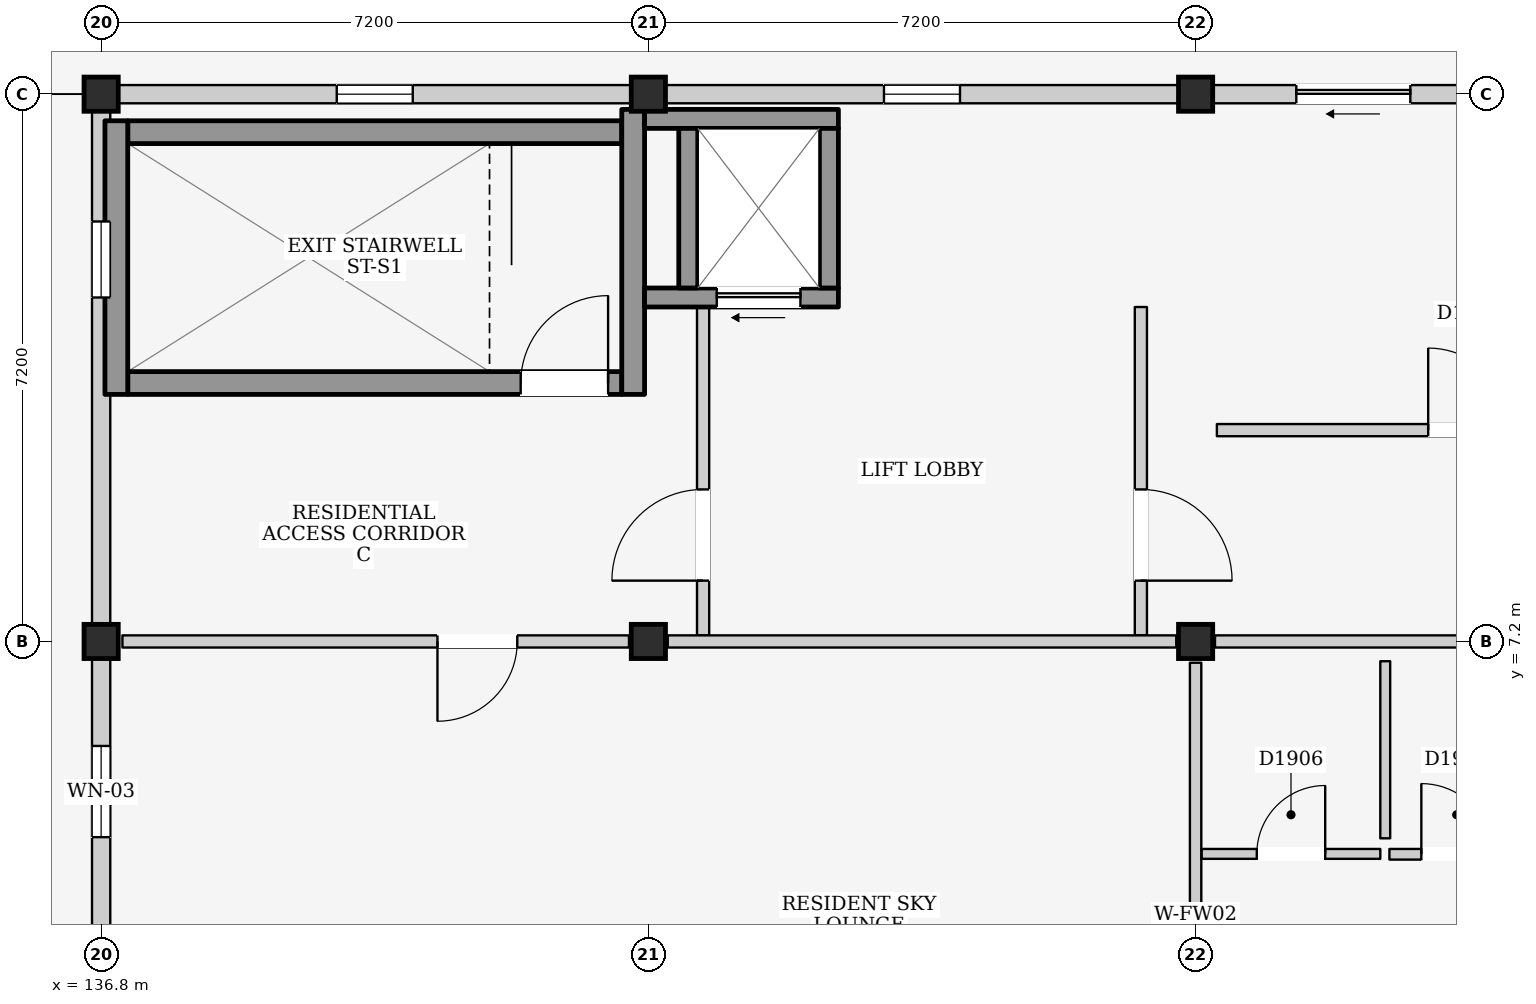
"""IFC4 building model, lengths in metres.
Left out: names, types, materials, properties, quantities, classifications, styles, units other than length and angle.
Written with IfcOpenShell. Run it as: python <this file> out.ifc"""

import sys

from ifc_helpers import new_model, si_unit, direction, frame, frame_2d, origin, origin_2d, place, context, subcontext, project, spatial, rectangle, extrude, element, fill, save


model = new_model("IFC4")
c1 = context("Model", 3, precision=1e-05, world=origin(), true_north=direction((0.0, 1.0)))
c2 = subcontext(c1, "Body", "Model", "MODEL_VIEW")
j1 = project(units=[si_unit("LENGTHUNIT", "METRE"), si_unit("PLANEANGLEUNIT", "RADIAN")], contexts=[c1])
p1 = place(None, origin())
s1 = spatial("IfcSite", under=j1, at=p1, CompositionType="ELEMENT")
p2 = place(p1, origin())
s2 = spatial("IfcBuilding", under=s1, at=p2, CompositionType="ELEMENT")
p3 = place(p2, frame((0.0, 0.0, 34.8)))
s3 = spatial("IfcBuildingStorey", under=s2, at=p3, CompositionType="ELEMENT", Elevation=34.8)
for number, where, z_axis, x_axis in (
    (1, (136.8, 7.2, 0.0), (0.0, 0.0, 1.0), (1.0, 0.0, 0.0)),
    (2, (136.8, 14.4, 0.0), (0.0, 0.0, 1.0), (1.0, 0.0, 0.0)),
    (3, (144.0, 7.2, 0.0), (0.0, 0.0, 1.0), (1.0, 0.0, 0.0)),
    (4, (144.0, 14.4, 0.0), (0.0, 0.0, 1.0), (1.0, 0.0, 0.0)),
    (5, (151.2, 7.2, 0.0), (0.0, 0.0, 1.0), (1.0, 0.0, 0.0)),
    (6, (151.2, 14.4, 0.0), (0.0, 0.0, 1.0), (1.0, 0.0, 0.0)),
):
    element("IfcColumn", number, at=place(p3, frame(where, z_axis=z_axis, x_axis=x_axis)), inside=s3, PredefinedType="COLUMN", context=c2, shape_type="SweptSolid", body=[
        extrude(rectangle(XDim=0.45, YDim=0.45, at=origin_2d()), origin(), (0.0, 0.0, 1.0), 3.2),
    ])
p4 = place(p3, frame((136.8, 0.225, 0.0), z_axis=(0.0, 0.0, 1.0), x_axis=(0.0, 1.0, 0.0)))
e7 = element("IfcWall", 7, at=p4, inside=s3, PredefinedType="ELEMENTEDWALL", context=c2, shape_type="SweptSolid", body=[
    extrude(rectangle(XDim=6.75, YDim=0.24, at=frame_2d((3.375, 0.0))), origin(), (0.0, 0.0, 1.0), 2.445),
])
p5 = place(p4, frame((1.4, 0.0, 0.0)))
e8 = element("IfcOpeningElement", 8, at=p5, cuts=e7, PredefinedType="OPENING", context=c2, shape_type="SweptSolid", body=[
    extrude(rectangle(XDim=1.4, YDim=2.1, at=frame_2d((0.7, 1.05))), frame((0.0, 0.135, 0.0), z_axis=(0.0, -1.0, 0.0), x_axis=(1.0, 0.0, 0.0)), (0.0, 0.0, 1.0), 0.27),
])
p6 = place(p4, frame((4.4, 0.0, 0.95)))
e9 = element("IfcOpeningElement", 9, at=p6, cuts=e7, PredefinedType="OPENING", context=c2, shape_type="SweptSolid", body=[
    extrude(rectangle(XDim=1.2, YDim=1.35, at=frame_2d((0.6, 0.675))), frame((0.0, 0.135, 0.0), z_axis=(0.0, -1.0, 0.0), x_axis=(1.0, 0.0, 0.0)), (0.0, 0.0, 1.0), 0.27),
])
p7 = place(p3, frame((137.025, 14.4, 0.0), z_axis=(0.0, 0.0, 1.0), x_axis=(1.0, 0.0, 0.0)))
e10 = element("IfcWall", 10, at=p7, inside=s3, PredefinedType="ELEMENTEDWALL", context=c2, shape_type="SweptSolid", body=[
    extrude(rectangle(XDim=6.75, YDim=0.24, at=frame_2d((3.375, 0.0))), origin(), (0.0, 0.0, 1.0), 2.345),
])
p8 = place(p7, frame((2.875, 0.0, 1.2)))
e11 = element("IfcOpeningElement", 11, at=p8, cuts=e10, PredefinedType="OPENING", context=c2, shape_type="SweptSolid", body=[
    extrude(rectangle(XDim=1.0, YDim=0.9, at=frame_2d((0.5, 0.45))), frame((0.0, 0.135, 0.0), z_axis=(0.0, -1.0, 0.0), x_axis=(1.0, 0.0, 0.0)), (0.0, 0.0, 1.0), 0.27),
])
p9 = place(p3, frame((136.8, 7.425, 0.0), z_axis=(0.0, 0.0, 1.0), x_axis=(0.0, 1.0, 0.0)))
e12 = element("IfcWall", 12, at=p9, inside=s3, PredefinedType="ELEMENTEDWALL", context=c2, shape_type="SweptSolid", body=[
    extrude(rectangle(XDim=6.75, YDim=0.24, at=frame_2d((3.375, 0.0))), origin(), (0.0, 0.0, 1.0), 2.445),
])
p10 = place(p9, frame((4.3, 0.0, 1.2)))
e13 = element("IfcOpeningElement", 13, at=p10, cuts=e12, PredefinedType="OPENING", context=c2, shape_type="SweptSolid", body=[
    extrude(rectangle(XDim=1.0, YDim=0.9, at=frame_2d((0.5, 0.45))), frame((0.0, 0.135, 0.0), z_axis=(0.0, -1.0, 0.0), x_axis=(1.0, 0.0, 0.0)), (0.0, 0.0, 1.0), 0.27),
])
p11 = place(p3, frame((144.225, 14.4, 0.0), z_axis=(0.0, 0.0, 1.0), x_axis=(1.0, 0.0, 0.0)))
e14 = element("IfcWall", 14, at=p11, inside=s3, PredefinedType="ELEMENTEDWALL", context=c2, shape_type="SweptSolid", body=[
    extrude(rectangle(XDim=6.75, YDim=0.24, at=frame_2d((3.375, 0.0))), origin(), (0.0, 0.0, 1.0), 2.345),
])
p12 = place(p11, frame((2.875, 0.0, 1.2)))
e15 = element("IfcOpeningElement", 15, at=p12, cuts=e14, PredefinedType="OPENING", context=c2, shape_type="SweptSolid", body=[
    extrude(rectangle(XDim=1.0, YDim=0.9, at=frame_2d((0.5, 0.45))), frame((0.0, 0.135, 0.0), z_axis=(0.0, -1.0, 0.0), x_axis=(1.0, 0.0, 0.0)), (0.0, 0.0, 1.0), 0.27),
])
p13 = place(p3, frame((151.425, 14.4, 0.0), z_axis=(0.0, 0.0, 1.0), x_axis=(1.0, 0.0, 0.0)))
e16 = element("IfcWall", 16, at=p13, inside=s3, PredefinedType="ELEMENTEDWALL", context=c2, shape_type="SweptSolid", body=[
    extrude(rectangle(XDim=6.75, YDim=0.24, at=frame_2d((3.375, 0.0))), origin(), (0.0, 0.0, 1.0), 2.345),
])
p14 = place(p13, frame((1.1, 0.0, 0.0)))
e17 = element("IfcOpeningElement", 17, at=p14, cuts=e16, PredefinedType="OPENING", context=c2, shape_type="SweptSolid", body=[
    extrude(rectangle(XDim=1.5, YDim=2.12, at=frame_2d((0.75, 1.06))), frame((0.0, 0.135, 0.0), z_axis=(0.0, -1.0, 0.0), x_axis=(1.0, 0.0, 0.0)), (0.0, 0.0, 1.0), 0.27),
])
p15 = place(p13, frame((3.6, 0.0, 0.735)))
e18 = element("IfcOpeningElement", 18, at=p15, cuts=e16, PredefinedType="OPENING", context=c2, shape_type="SweptSolid", body=[
    extrude(rectangle(XDim=1.35, YDim=1.5, at=frame_2d((0.675, 0.75))), frame((0.0, 0.135, 0.0), z_axis=(0.0, -1.0, 0.0), x_axis=(1.0, 0.0, 0.0)), (0.0, 0.0, 1.0), 0.27),
])
p16 = place(p3, frame((137.15, 10.6, 0.0), z_axis=(0.0, 0.0, 1.0), x_axis=(1.0, 0.0, 0.0)))
e19 = element("IfcWall", 19, at=p16, inside=s3, PredefinedType="SHEAR", context=c2, shape_type="SweptSolid", body=[
    extrude(rectangle(XDim=6.5, YDim=0.3, at=frame_2d((3.25, 0.0))), origin(), (0.0, 0.0, 1.0), 2.96),
])
p17 = place(p16, frame((5.17, 0.0, 0.0)))
e20 = element("IfcOpeningElement", 20, at=p17, cuts=e19, PredefinedType="OPENING", context=c2, shape_type="SweptSolid", body=[
    extrude(rectangle(XDim=1.15, YDim=2.2, at=frame_2d((0.575, 1.1))), frame((0.0, 0.165, 0.0), z_axis=(0.0, -1.0, 0.0), x_axis=(1.0, 0.0, 0.0)), (0.0, 0.0, 1.0), 0.33),
])
p18 = place(p3, frame((137.15, 13.9, 0.0), z_axis=(0.0, 0.0, 1.0), x_axis=(1.0, 0.0, 0.0)))
e21 = element("IfcWall", 21, at=p18, inside=s3, PredefinedType="SHEAR", context=c2, shape_type="SweptSolid", body=[
    extrude(rectangle(XDim=6.5, YDim=0.3, at=frame_2d((3.25, 0.0))), origin(), (0.0, 0.0, 1.0), 2.96),
])
p19 = place(p3, frame((137.0, 10.45, 0.0), z_axis=(0.0, 0.0, 1.0), x_axis=(0.0, 1.0, 0.0)))
e22 = element("IfcWall", 22, at=p19, inside=s3, PredefinedType="SHEAR", context=c2, shape_type="SweptSolid", body=[
    extrude(rectangle(XDim=3.6, YDim=0.3, at=frame_2d((1.8, 0.0))), origin(), (0.0, 0.0, 1.0), 2.96),
])
p20 = place(p3, frame((143.8, 10.45, 0.0), z_axis=(0.0, 0.0, 1.0), x_axis=(0.0, 1.0, 0.0)))
e23 = element("IfcWall", 23, at=p20, inside=s3, PredefinedType="SHEAR", context=c2, shape_type="SweptSolid", body=[
    extrude(rectangle(XDim=3.75, YDim=0.3, at=frame_2d((1.875, 0.0))), origin(), (0.0, 0.0, 1.0), 2.96),
])
p21 = place(p3, frame((144.72, 7.28, 0.0), z_axis=(0.0, 0.0, 1.0), x_axis=(0.0, 1.0, 0.0)))
e24 = element("IfcWall", 24, at=p21, inside=s3, PredefinedType="PARTITIONING", context=c2, shape_type="SweptSolid", body=[
    extrude(rectangle(XDim=4.32, YDim=0.16, at=frame_2d((2.16, 0.0))), origin(), (0.0, 0.0, 1.0), 2.96),
])
p22 = place(p21, frame((0.72, 0.0, 0.0)))
e25 = element("IfcOpeningElement", 25, at=p22, cuts=e24, PredefinedType="OPENING", context=c2, shape_type="SweptSolid", body=[
    extrude(rectangle(XDim=1.2, YDim=2.2, at=frame_2d((0.6, 1.1))), frame((0.0, 0.095, 0.0), z_axis=(0.0, -1.0, 0.0), x_axis=(1.0, 0.0, 0.0)), (0.0, 0.0, 1.0), 0.19),
])
p23 = place(p3, frame((150.48, 7.28, 0.0), z_axis=(0.0, 0.0, 1.0), x_axis=(0.0, 1.0, 0.0)))
e26 = element("IfcWall", 26, at=p23, inside=s3, PredefinedType="PARTITIONING", context=c2, shape_type="SweptSolid", body=[
    extrude(rectangle(XDim=4.32, YDim=0.16, at=frame_2d((2.16, 0.0))), origin(), (0.0, 0.0, 1.0), 2.96),
])
p24 = place(p23, frame((0.72, 0.0, 0.0)))
e27 = element("IfcOpeningElement", 27, at=p24, cuts=e26, PredefinedType="OPENING", context=c2, shape_type="SweptSolid", body=[
    extrude(rectangle(XDim=1.2, YDim=2.2, at=frame_2d((0.6, 1.1))), frame((0.0, 0.095, 0.0), z_axis=(0.0, -1.0, 0.0), x_axis=(1.0, 0.0, 0.0)), (0.0, 0.0, 1.0), 0.19),
])
p25 = place(p3, frame((143.95, 11.725, 0.0), z_axis=(0.0, 0.0, 1.0), x_axis=(1.0, 0.0, 0.0)))
e28 = element("IfcWall", 28, at=p25, inside=s3, PredefinedType="SHEAR", context=c2, shape_type="SweptSolid", body=[
    extrude(rectangle(XDim=2.55, YDim=0.25, at=frame_2d((1.275, 0.0))), origin(), (0.0, 0.0, 1.0), 2.96),
])
p26 = place(p25, frame((0.95, 0.0, 0.0)))
e29 = element("IfcOpeningElement", 29, at=p26, cuts=e28, PredefinedType="OPENING", context=c2, shape_type="SweptSolid", body=[
    extrude(rectangle(XDim=1.1, YDim=2.15, at=frame_2d((0.55, 1.075))), frame((0.0, 0.14, 0.0), z_axis=(0.0, -1.0, 0.0), x_axis=(1.0, 0.0, 0.0)), (0.0, 0.0, 1.0), 0.28),
])
p27 = place(p3, frame((143.95, 14.075, 0.0), z_axis=(0.0, 0.0, 1.0), x_axis=(1.0, 0.0, 0.0)))
e30 = element("IfcWall", 30, at=p27, inside=s3, PredefinedType="SHEAR", context=c2, shape_type="SweptSolid", body=[
    extrude(rectangle(XDim=2.55, YDim=0.25, at=frame_2d((1.275, 0.0))), origin(), (0.0, 0.0, 1.0), 2.96),
])
for number, where, z_axis, x_axis in (
    (31, (144.525, 11.85, 0.0), (0.0, 0.0, 1.0), (0.0, 1.0, 0.0)),
    (32, (146.375, 11.85, 0.0), (0.0, 0.0, 1.0), (0.0, 1.0, 0.0)),
):
    element("IfcWall", number, at=place(p3, frame(where, z_axis=z_axis, x_axis=x_axis)), inside=s3, PredefinedType="SHEAR", context=c2, shape_type="SweptSolid", body=[
        extrude(rectangle(XDim=2.1, YDim=0.25, at=frame_2d((1.05, 0.0))), origin(), (0.0, 0.0, 1.0), 2.96),
    ])
p28 = place(p3, frame((137.08, 7.2, 0.0), z_axis=(0.0, 0.0, 1.0), x_axis=(1.0, 0.0, 0.0)))
e33 = element("IfcWall", 33, at=p28, inside=s3, PredefinedType="PARTITIONING", context=c2, shape_type="SweptSolid", body=[
    extrude(rectangle(XDim=6.665, YDim=0.16, at=frame_2d((3.333, 0.0))), origin(), (0.0, 0.0, 1.0), 2.345),
])
p29 = place(p28, frame((4.145, 0.0, 0.0)))
e34 = element("IfcOpeningElement", 34, at=p29, cuts=e33, PredefinedType="OPENING", context=c2, shape_type="SweptSolid", body=[
    extrude(rectangle(XDim=1.05, YDim=2.2, at=frame_2d((0.525, 1.1))), frame((0.0, 0.095, 0.0), z_axis=(0.0, -1.0, 0.0), x_axis=(1.0, 0.0, 0.0)), (0.0, 0.0, 1.0), 0.19),
])
p30 = place(p3, frame((144.255, 7.2, 0.0), z_axis=(0.0, 0.0, 1.0), x_axis=(1.0, 0.0, 0.0)))
e35 = element("IfcWall", 35, at=p30, inside=s3, PredefinedType="PARTITIONING", context=c2, shape_type="SweptSolid", body=[
    extrude(rectangle(XDim=6.69, YDim=0.16, at=frame_2d((3.345, 0.0))), origin(), (0.0, 0.0, 1.0), 2.345),
])
p31 = place(p3, frame((151.2, 0.28, 0.0), z_axis=(0.0, 0.0, 1.0), x_axis=(0.0, 1.0, 0.0)))
e36 = element("IfcWall", 36, at=p31, inside=s3, PredefinedType="PARTITIONING", context=c2, shape_type="SweptSolid", body=[
    extrude(rectangle(XDim=6.64, YDim=0.15, at=frame_2d((3.32, 0.0))), origin(), (0.0, 0.0, 1.0), 2.445),
])
p32 = place(p3, frame((151.455, 7.2, 0.0), z_axis=(0.0, 0.0, 1.0), x_axis=(1.0, 0.0, 0.0)))
e37 = element("IfcWall", 37, at=p32, inside=s3, PredefinedType="PARTITIONING", context=c2, shape_type="SweptSolid", body=[
    extrude(rectangle(XDim=6.69, YDim=0.16, at=frame_2d((3.345, 0.0))), origin(), (0.0, 0.0, 1.0), 2.345),
])
p33 = place(p32, frame((4.895, 0.0, 0.0)))
e38 = element("IfcOpeningElement", 38, at=p33, cuts=e37, PredefinedType="OPENING", context=c2, shape_type="SweptSolid", body=[
    extrude(rectangle(XDim=1.0, YDim=2.15, at=frame_2d((0.5, 1.075))), frame((0.0, 0.095, 0.0), z_axis=(0.0, -1.0, 0.0), x_axis=(1.0, 0.0, 0.0)), (0.0, 0.0, 1.0), 0.19),
])
p34 = place(p3, frame((151.28, 4.405, 0.0), z_axis=(0.0, 0.0, 1.0), x_axis=(1.0, 0.0, 0.0)))
e39 = element("IfcWall", 39, at=p34, inside=s3, PredefinedType="PARTITIONING", context=c2, shape_type="SweptSolid", body=[
    extrude(rectangle(XDim=2.35, YDim=0.13, at=frame_2d((1.175, 0.0))), origin(), (0.0, 0.0, 1.0), 2.96),
])
p35 = place(p34, frame((0.725, 0.0, 0.0)))
e40 = element("IfcOpeningElement", 40, at=p35, cuts=e39, PredefinedType="OPENING", context=c2, shape_type="SweptSolid", body=[
    extrude(rectangle(XDim=0.9, YDim=2.1, at=frame_2d((0.45, 1.05))), frame((0.0, 0.08, 0.0), z_axis=(0.0, -1.0, 0.0), x_axis=(1.0, 0.0, 0.0)), (0.0, 0.0, 1.0), 0.16),
])
p36 = place(p3, frame((153.695, 4.61, 0.0), z_axis=(0.0, 0.0, 1.0), x_axis=(0.0, 1.0, 0.0)))
e41 = element("IfcWall", 41, at=p36, inside=s3, PredefinedType="PARTITIONING", context=c2, shape_type="SweptSolid", body=[
    extrude(rectangle(XDim=2.33, YDim=0.13, at=frame_2d((1.165, 0.0))), origin(), (0.0, 0.0, 1.0), 2.96),
])
p37 = place(p3, frame((153.75, 4.4, 0.0), z_axis=(0.0, 0.0, 1.0), x_axis=(1.0, 0.0, 0.0)))
e42 = element("IfcWall", 42, at=p37, inside=s3, PredefinedType="PARTITIONING", context=c2, shape_type="SweptSolid", body=[
    extrude(rectangle(XDim=1.77, YDim=0.14, at=frame_2d((0.885, 0.0))), origin(), (0.0, 0.0, 1.0), 2.96),
])
p38 = place(p37, frame((0.42, 0.0, 0.0)))
e43 = element("IfcOpeningElement", 43, at=p38, cuts=e42, PredefinedType="OPENING", context=c2, shape_type="SweptSolid", body=[
    extrude(rectangle(XDim=0.93, YDim=2.14, at=frame_2d((0.465, 1.07))), frame((0.0, 0.085, 0.0), z_axis=(0.0, -1.0, 0.0), x_axis=(1.0, 0.0, 0.0)), (0.0, 0.0, 1.0), 0.17),
])
p39 = place(p3, frame((151.48, 9.98, 0.0), z_axis=(0.0, 0.0, 1.0), x_axis=(1.0, 0.0, 0.0)))
e44 = element("IfcWall", 44, at=p39, inside=s3, PredefinedType="PARTITIONING", context=c2, shape_type="SweptSolid", body=[
    extrude(rectangle(XDim=6.64, YDim=0.16, at=frame_2d((3.32, 0.0))), origin(), (0.0, 0.0, 1.0), 2.96),
])
p40 = place(p39, frame((2.78, 0.0, 0.0)))
e45 = element("IfcOpeningElement", 45, at=p40, cuts=e44, PredefinedType="OPENING", context=c2, shape_type="SweptSolid", body=[
    extrude(rectangle(XDim=1.08, YDim=2.22, at=frame_2d((0.54, 1.11))), frame((0.0, 0.095, 0.0), z_axis=(0.0, -1.0, 0.0), x_axis=(1.0, 0.0, 0.0)), (0.0, 0.0, 1.0), 0.19),
])
p41 = place(p6, origin())
e46 = element("IfcWindow", 46, at=p41, inside=s3, PartitioningType="SINGLE_PANEL", PredefinedType="WINDOW", context=c2, shape_type="SweptSolid", body=[
    extrude(rectangle(XDim=1.2, YDim=1.35, at=frame_2d((0.6, 0.675))), frame((0.0, 0.03, 0.0), z_axis=(0.0, -1.0, 0.0), x_axis=(1.0, 0.0, 0.0)), (0.0, 0.0, 1.0), 0.06),
])
fill(e9, e46)
p42 = place(p8, origin())
e47 = element("IfcWindow", 47, at=p42, inside=s3, PartitioningType="SINGLE_PANEL", PredefinedType="WINDOW", context=c2, shape_type="SweptSolid", body=[
    extrude(rectangle(XDim=1.0, YDim=0.9, at=frame_2d((0.5, 0.45))), frame((0.0, 0.03, 0.0), z_axis=(0.0, -1.0, 0.0), x_axis=(1.0, 0.0, 0.0)), (0.0, 0.0, 1.0), 0.06),
])
fill(e11, e47)
p43 = place(p10, origin())
e48 = element("IfcWindow", 48, at=p43, inside=s3, PartitioningType="SINGLE_PANEL", PredefinedType="WINDOW", context=c2, shape_type="SweptSolid", body=[
    extrude(rectangle(XDim=1.0, YDim=0.9, at=frame_2d((0.5, 0.45))), frame((0.0, 0.03, 0.0), z_axis=(0.0, -1.0, 0.0), x_axis=(1.0, 0.0, 0.0)), (0.0, 0.0, 1.0), 0.06),
])
fill(e13, e48)
p44 = place(p12, origin())
e49 = element("IfcWindow", 49, at=p44, inside=s3, PartitioningType="SINGLE_PANEL", PredefinedType="WINDOW", context=c2, shape_type="SweptSolid", body=[
    extrude(rectangle(XDim=1.0, YDim=0.9, at=frame_2d((0.5, 0.45))), frame((0.0, 0.03, 0.0), z_axis=(0.0, -1.0, 0.0), x_axis=(1.0, 0.0, 0.0)), (0.0, 0.0, 1.0), 0.06),
])
fill(e15, e49)
p45 = place(p14, frame((1.5, 0.0, 0.0), z_axis=(0.0, 0.0, 1.0), x_axis=(-1.0, 0.0, 0.0)))
e50 = element("IfcDoor", 50, at=p45, inside=s3, OperationType="SLIDING_TO_LEFT", PredefinedType="DOOR", context=c2, shape_type="SweptSolid", body=[
    extrude(rectangle(XDim=1.5, YDim=2.12, at=frame_2d((0.75, 1.06))), frame((0.0, 0.025, 0.0), z_axis=(0.0, -1.0, 0.0), x_axis=(1.0, 0.0, 0.0)), (0.0, 0.0, 1.0), 0.05),
])
fill(e17, e50)
p46 = place(p17, origin())
e51 = element("IfcDoor", 51, at=p46, inside=s3, OperationType="SINGLE_SWING_RIGHT", PredefinedType="DOOR", context=c2, shape_type="SweptSolid", body=[
    extrude(rectangle(XDim=1.15, YDim=2.2, at=frame_2d((0.575, 1.1))), frame((0.0, 0.025, 0.0), z_axis=(0.0, -1.0, 0.0), x_axis=(1.0, 0.0, 0.0)), (0.0, 0.0, 1.0), 0.05),
])
fill(e20, e51)
p47 = place(p22, origin())
e52 = element("IfcDoor", 52, at=p47, inside=s3, OperationType="SINGLE_SWING_LEFT", PredefinedType="DOOR", context=c2, shape_type="SweptSolid", body=[
    extrude(rectangle(XDim=1.2, YDim=2.2, at=frame_2d((0.6, 1.1))), frame((0.0, 0.025, 0.0), z_axis=(0.0, -1.0, 0.0), x_axis=(1.0, 0.0, 0.0)), (0.0, 0.0, 1.0), 0.05),
])
fill(e25, e52)
p48 = place(p24, frame((1.2, 0.0, 0.0), z_axis=(0.0, 0.0, 1.0), x_axis=(-1.0, 0.0, 0.0)))
e53 = element("IfcDoor", 53, at=p48, inside=s3, OperationType="SINGLE_SWING_RIGHT", PredefinedType="DOOR", context=c2, shape_type="SweptSolid", body=[
    extrude(rectangle(XDim=1.2, YDim=2.2, at=frame_2d((0.6, 1.1))), frame((0.0, 0.025, 0.0), z_axis=(0.0, -1.0, 0.0), x_axis=(1.0, 0.0, 0.0)), (0.0, 0.0, 1.0), 0.05),
])
fill(e27, e53)
p49 = place(p26, frame((1.1, 0.0, 0.0), z_axis=(0.0, 0.0, 1.0), x_axis=(-1.0, 0.0, 0.0)))
e54 = element("IfcDoor", 54, at=p49, inside=s3, OperationType="SLIDING_TO_LEFT", PredefinedType="DOOR", context=c2, shape_type="SweptSolid", body=[
    extrude(rectangle(XDim=1.1, YDim=2.15, at=frame_2d((0.55, 1.075))), frame((0.0, 0.025, 0.0), z_axis=(0.0, -1.0, 0.0), x_axis=(1.0, 0.0, 0.0)), (0.0, 0.0, 1.0), 0.05),
])
fill(e29, e54)
p50 = place(p29, frame((1.05, 0.0, 0.0), z_axis=(0.0, 0.0, 1.0), x_axis=(-1.0, 0.0, 0.0)))
e55 = element("IfcDoor", 55, at=p50, inside=s3, OperationType="SINGLE_SWING_RIGHT", PredefinedType="DOOR", context=c2, shape_type="SweptSolid", body=[
    extrude(rectangle(XDim=1.05, YDim=2.2, at=frame_2d((0.525, 1.1))), frame((0.0, 0.025, 0.0), z_axis=(0.0, -1.0, 0.0), x_axis=(1.0, 0.0, 0.0)), (0.0, 0.0, 1.0), 0.05),
])
fill(e34, e55)
p51 = place(p35, origin())
e56 = element("IfcDoor", 56, at=p51, inside=s3, OperationType="SINGLE_SWING_RIGHT", PredefinedType="DOOR", context=c2, shape_type="SweptSolid", body=[
    extrude(rectangle(XDim=0.9, YDim=2.1, at=frame_2d((0.45, 1.05))), frame((0.0, 0.025, 0.0), z_axis=(0.0, -1.0, 0.0), x_axis=(1.0, 0.0, 0.0)), (0.0, 0.0, 1.0), 0.05),
])
fill(e40, e56)
p52 = place(p38, origin())
e57 = element("IfcDoor", 57, at=p52, inside=s3, OperationType="SINGLE_SWING_LEFT", PredefinedType="DOOR", context=c2, shape_type="SweptSolid", body=[
    extrude(rectangle(XDim=0.93, YDim=2.14, at=frame_2d((0.465, 1.07))), frame((0.0, 0.025, 0.0), z_axis=(0.0, -1.0, 0.0), x_axis=(1.0, 0.0, 0.0)), (0.0, 0.0, 1.0), 0.05),
])
fill(e43, e57)
p53 = place(p40, origin())
e58 = element("IfcDoor", 58, at=p53, inside=s3, OperationType="SINGLE_SWING_LEFT", PredefinedType="DOOR", context=c2, shape_type="SweptSolid", body=[
    extrude(rectangle(XDim=1.08, YDim=2.22, at=frame_2d((0.54, 1.11))), frame((0.0, 0.025, 0.0), z_axis=(0.0, -1.0, 0.0), x_axis=(1.0, 0.0, 0.0)), (0.0, 0.0, 1.0), 0.05),
])
fill(e45, e58)
save(model, sys.argv[1])
